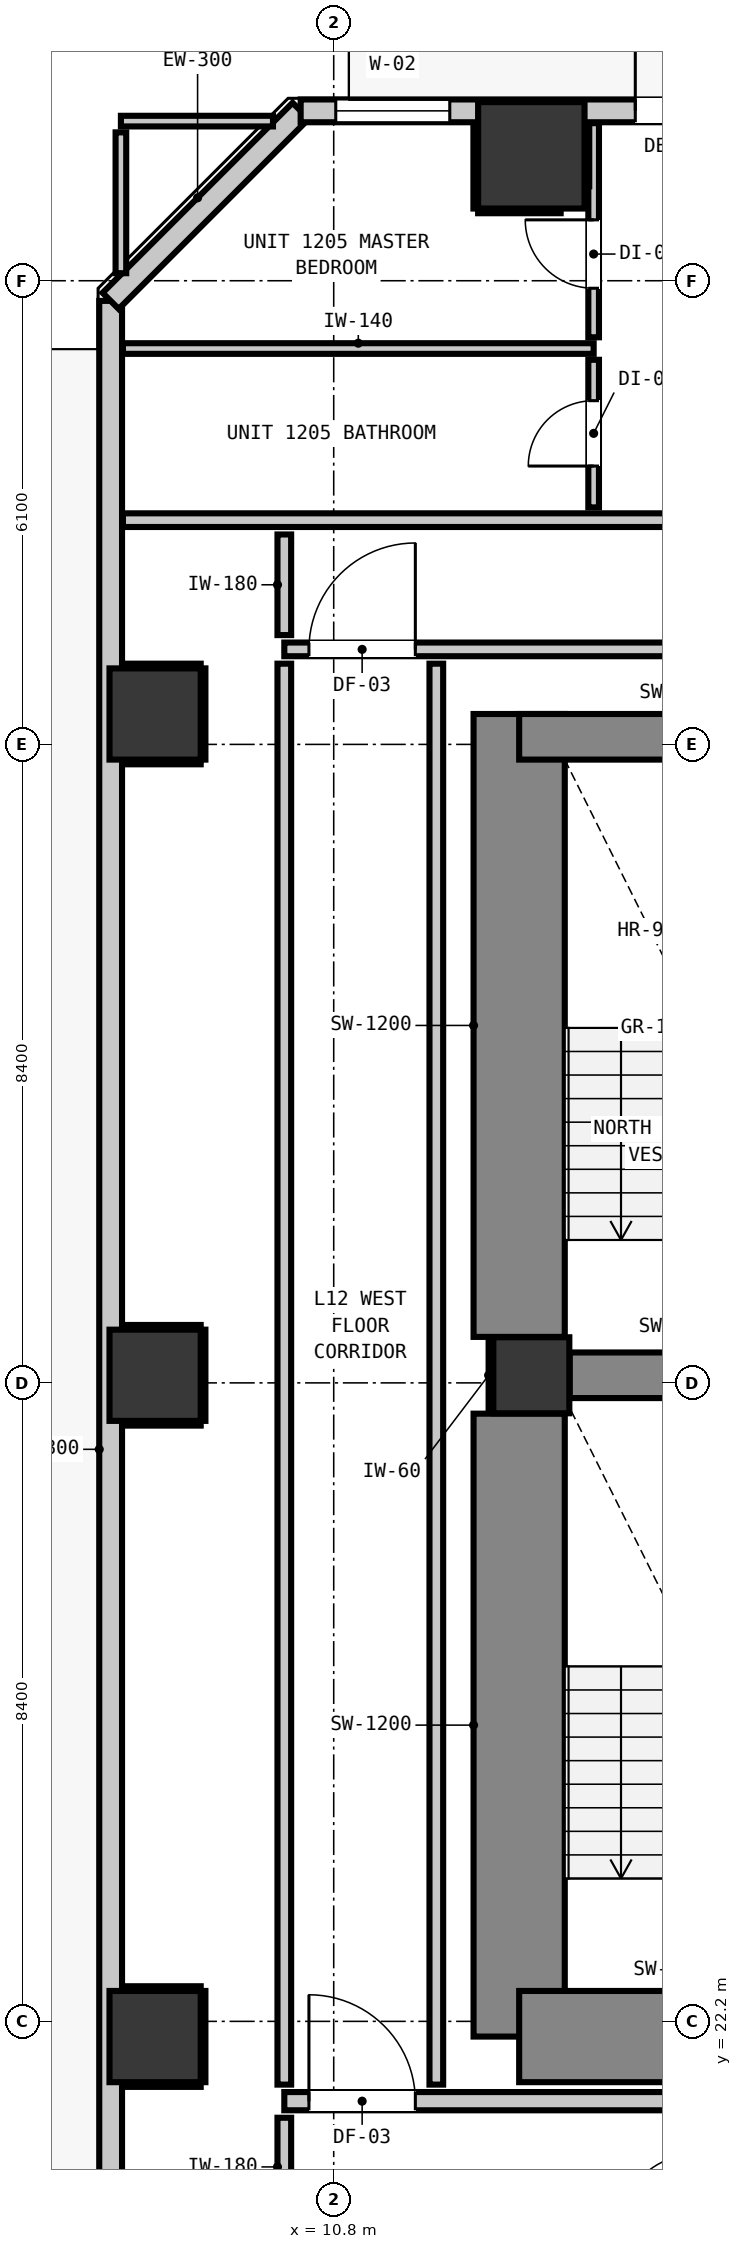
"""IFC4 building model, lengths in metres.
Left out: names, types, materials, properties, quantities, classifications, styles, units other than length and angle.
Written with IfcOpenShell. Run it as: python <this file> out.ifc"""

import sys

from ifc_helpers import new_model, si_unit, direction, frame, frame_2d, origin, origin_2d, place, context, subcontext, project, spatial, rectangle, extrude, element, fill, save


model = new_model("IFC4")
c1 = context("Model", 3, precision=1e-05, world=origin(), true_north=direction((0.0, 1.0)))
c2 = subcontext(c1, "Body", "Model", "MODEL_VIEW")
j1 = project(units=[si_unit("LENGTHUNIT", "METRE"), si_unit("PLANEANGLEUNIT", "RADIAN")], contexts=[c1])
p1 = place(None, origin())
s1 = spatial("IfcSite", under=j1, at=p1, CompositionType="ELEMENT")
p2 = place(p1, origin())
s2 = spatial("IfcBuilding", under=s1, at=p2, CompositionType="ELEMENT")
p3 = place(p2, frame((0.0, 0.0, 45.24)))
s3 = spatial("IfcBuildingStorey", under=s2, at=p3, CompositionType="ELEMENT", Elevation=45.24)
p4 = place(p3, frame((13.4, 30.7, 0.0), z_axis=(0.0, 0.0, 1.0), x_axis=(1.0, 0.0, 0.0)))
e1 = element("IfcColumn", 1, at=p4, inside=s3, PredefinedType="COLUMN", context=c2, shape_type="SweptSolid", body=[
    extrude(rectangle(XDim=1.0, YDim=1.0, at=origin_2d()), origin(), (0.0, 0.0, 1.0), 3.32),
])
p5 = place(p3, frame((13.24, 22.0, 0.0), z_axis=(0.0, 0.0, 1.0), x_axis=(0.0, 1.0, 0.0)))
e2 = element("IfcWall", 2, at=p5, inside=s3, PredefinedType="SHEAR", context=c2, shape_type="SweptSolid", body=[
    extrude(rectangle(XDim=8.195, YDim=1.2, at=frame_2d((4.098, 0.0))), origin(), (0.0, 0.0, 1.0), 3.32),
])
p6 = place(p3, frame((13.24, 31.205, 0.0), z_axis=(0.0, 0.0, 1.0), x_axis=(0.0, 1.0, 0.0)))
e3 = element("IfcWall", 3, at=p6, inside=s3, PredefinedType="SHEAR", context=c2, shape_type="SweptSolid", body=[
    extrude(rectangle(XDim=8.195, YDim=1.2, at=frame_2d((4.097, 0.0))), origin(), (0.0, 0.0, 1.0), 3.32),
])
p7 = place(p3, frame((13.24, 22.0, 0.0), z_axis=(0.0, 0.0, 1.0), x_axis=(1.0, 0.0, 0.0)))
e4 = element("IfcWall", 4, at=p7, inside=s3, PredefinedType="SHEAR", context=c2, shape_type="SweptSolid", body=[
    extrude(rectangle(XDim=4.08, YDim=1.2, at=frame_2d((2.04, 0.0))), origin(), (0.0, 0.0, 1.0), 3.32),
])
p8 = place(p3, frame((13.24, 39.1, 0.0), z_axis=(0.0, 0.0, 1.0), x_axis=(1.0, 0.0, 0.0)))
e5 = element("IfcWall", 5, at=p8, inside=s3, PredefinedType="SHEAR", context=c2, shape_type="SweptSolid", body=[
    extrude(rectangle(XDim=4.08, YDim=0.6, at=frame_2d((2.04, 0.0))), origin(), (0.0, 0.0, 1.0), 3.32),
])
p9 = place(p3, frame((13.905, 30.7, 0.0), z_axis=(0.0, 0.0, 1.0), x_axis=(1.0, 0.0, 0.0)))
e6 = element("IfcWall", 6, at=p9, inside=s3, PredefinedType="SHEAR", context=c2, shape_type="SweptSolid", body=[
    extrude(rectangle(XDim=3.415, YDim=0.6, at=frame_2d((1.708, 0.0))), origin(), (0.0, 0.0, 1.0), 3.32),
])
p10 = place(p3, frame((13.4, 46.75, 0.0), z_axis=(0.0, 0.0, 1.0), x_axis=(1.0, 0.0, 0.0)))
e7 = element("IfcColumn", 7, at=p10, inside=s3, PredefinedType="COLUMN", context=c2, shape_type="SweptSolid", body=[
    extrude(rectangle(XDim=1.4, YDim=1.4, at=origin_2d()), origin(), (0.0, 0.0, 1.0), 3.32),
])
for number, where, z_axis, x_axis in (
    (8, (8.45, 22.0, 0.0), (0.0, 0.0, 1.0), (1.0, 0.0, 0.0)),
    (9, (8.45, 30.7, 0.0), (0.0, 0.0, 1.0), (1.0, 0.0, 0.0)),
    (10, (8.45, 39.4, 0.0), (0.0, 0.0, 1.0), (1.0, 0.0, 0.0)),
):
    element("IfcColumn", number, at=place(p3, frame(where, z_axis=z_axis, x_axis=x_axis)), inside=s3, PredefinedType="COLUMN", context=c2, shape_type="SweptSolid", body=[
        extrude(rectangle(XDim=1.2, YDim=1.2, at=origin_2d()), origin(), (0.0, 0.0, 1.0), 3.32),
    ])
p11 = place(p3, frame((7.865, 10.165, 0.0), z_axis=(0.0, 0.0, 1.0), x_axis=(0.0, 1.0, 0.0)))
e11 = element("IfcWall", 11, at=p11, inside=s3, PredefinedType="STANDARD", context=c2, shape_type="SweptSolid", body=[
    extrude(rectangle(XDim=34.67, YDim=0.3, at=frame_2d((17.335, 0.0))), origin(), (0.0, 0.0, 1.0), 3.06),
])
p12 = place(p11, frame((3.352, 0.0, 0.0)))
e12 = element("IfcOpeningElement", 12, at=p12, cuts=e11, PredefinedType="OPENING", context=c2, shape_type="SweptSolid", body=[
    extrude(rectangle(XDim=1.0, YDim=2.15, at=frame_2d((0.5, 1.075))), frame((0.0, 0.16, 0.0), z_axis=(0.0, -1.0, 0.0), x_axis=(1.0, 0.0, 0.0)), (0.0, 0.0, 1.0), 0.32),
])
p13 = place(p3, frame((7.865, 44.835, 0.0), z_axis=(0.0, 0.0, 1.0), x_axis=(0.707106781187, 0.707106781187, 0.0)))
e13 = element("IfcWall", 13, at=p13, inside=s3, PredefinedType="STANDARD", context=c2, shape_type="SweptSolid", body=[
    extrude(rectangle(XDim=3.536, YDim=0.3, at=frame_2d((1.768, 0.0))), origin(), (0.0, 0.0, 1.0), 3.06),
])
p14 = place(p3, frame((10.365, 47.335, 0.0), z_axis=(0.0, 0.0, 1.0), x_axis=(1.0, 0.0, 0.0)))
e14 = element("IfcWall", 14, at=p14, inside=s3, PredefinedType="STANDARD", context=c2, shape_type="SweptSolid", body=[
    extrude(rectangle(XDim=37.47, YDim=0.3, at=frame_2d((18.735, 0.0))), origin(), (0.0, 0.0, 1.0), 3.06),
])
p15 = place(p14, frame((4.403, 0.0, 0.0)))
e15 = element("IfcOpeningElement", 15, at=p15, cuts=e14, PredefinedType="OPENING", context=c2, shape_type="SweptSolid", body=[
    extrude(rectangle(XDim=1.0, YDim=2.15, at=frame_2d((0.5, 1.075))), frame((0.0, 0.16, 0.0), z_axis=(0.0, -1.0, 0.0), x_axis=(1.0, 0.0, 0.0)), (0.0, 0.0, 1.0), 0.32),
])
p16 = place(p14, frame((5.814, 0.0, 0.85)))
e16 = element("IfcOpeningElement", 16, at=p16, cuts=e14, PredefinedType="OPENING", context=c2, shape_type="SweptSolid", body=[
    extrude(rectangle(XDim=0.58, YDim=1.5, at=frame_2d((0.29, 0.75))), frame((0.0, 0.16, 0.0), z_axis=(0.0, -1.0, 0.0), x_axis=(1.0, 0.0, 0.0)), (0.0, 0.0, 1.0), 0.32),
])
p17 = place(p14, frame((0.462, 0.0, 0.85)))
e17 = element("IfcOpeningElement", 17, at=p17, cuts=e14, PredefinedType="OPENING", context=c2, shape_type="SweptSolid", body=[
    extrude(rectangle(XDim=1.5, YDim=1.8, at=frame_2d((0.75, 0.9))), frame((0.0, 0.16, 0.0), z_axis=(0.0, -1.0, 0.0), x_axis=(1.0, 0.0, 0.0)), (0.0, 0.0, 1.0), 0.32),
])
p18 = place(p14, frame((13.885, 0.0, 0.85)))
e18 = element("IfcOpeningElement", 18, at=p18, cuts=e14, PredefinedType="OPENING", context=c2, shape_type="SweptSolid", body=[
    extrude(rectangle(XDim=1.5, YDim=1.8, at=frame_2d((0.75, 0.9))), frame((0.0, 0.16, 0.0), z_axis=(0.0, -1.0, 0.0), x_axis=(1.0, 0.0, 0.0)), (0.0, 0.0, 1.0), 0.32),
])
p19 = place(p14, frame((31.742, 0.0, 0.85)))
e19 = element("IfcOpeningElement", 19, at=p19, cuts=e14, PredefinedType="OPENING", context=c2, shape_type="SweptSolid", body=[
    extrude(rectangle(XDim=1.5, YDim=1.8, at=frame_2d((0.75, 0.9))), frame((0.0, 0.16, 0.0), z_axis=(0.0, -1.0, 0.0), x_axis=(1.0, 0.0, 0.0)), (0.0, 0.0, 1.0), 0.32),
])
p20 = place(p14, frame((27.268, 0.0, 0.85)))
e20 = element("IfcOpeningElement", 20, at=p20, cuts=e14, PredefinedType="OPENING", context=c2, shape_type="SweptSolid", body=[
    extrude(rectangle(XDim=1.5, YDim=1.8, at=frame_2d((0.75, 0.9))), frame((0.0, 0.16, 0.0), z_axis=(0.0, -1.0, 0.0), x_axis=(1.0, 0.0, 0.0)), (0.0, 0.0, 1.0), 0.32),
])
p21 = place(p3, frame((10.15, 21.15, 0.0), z_axis=(0.0, 0.0, 1.0), x_axis=(1.0, 0.0, 0.0)))
e21 = element("IfcWall", 21, at=p21, inside=s3, PredefinedType="PARTITIONING", context=c2, shape_type="SweptSolid", body=[
    extrude(rectangle(XDim=40.023, YDim=0.24, at=frame_2d((20.012, 0.0))), origin(), (0.0, 0.0, 1.0), 3.06),
])
p22 = place(p21, frame((8.06, 0.0, 0.0)))
e22 = element("IfcOpeningElement", 22, at=p22, cuts=e21, PredefinedType="OPENING", context=c2, shape_type="SweptSolid", body=[
    extrude(rectangle(XDim=1.1, YDim=2.15, at=frame_2d((0.55, 1.075))), frame((0.0, 0.13, 0.0), z_axis=(0.0, -1.0, 0.0), x_axis=(1.0, 0.0, 0.0)), (0.0, 0.0, 1.0), 0.26),
])
p23 = place(p21, frame((0.324, 0.0, 0.0)))
e23 = element("IfcOpeningElement", 23, at=p23, cuts=e21, PredefinedType="OPENING", context=c2, shape_type="SweptSolid", body=[
    extrude(rectangle(XDim=1.4, YDim=2.15, at=frame_2d((0.7, 1.075))), frame((0.0, 0.13, 0.0), z_axis=(0.0, -1.0, 0.0), x_axis=(1.0, 0.0, 0.0)), (0.0, 0.0, 1.0), 0.26),
])
p24 = place(p21, frame((33.574, 0.0, 0.0)))
e24 = element("IfcOpeningElement", 24, at=p24, cuts=e21, PredefinedType="OPENING", context=c2, shape_type="SweptSolid", body=[
    extrude(rectangle(XDim=1.0, YDim=2.15, at=frame_2d((0.5, 1.075))), frame((0.0, 0.13, 0.0), z_axis=(0.0, -1.0, 0.0), x_axis=(1.0, 0.0, 0.0)), (0.0, 0.0, 1.0), 0.26),
])
p25 = place(p3, frame((10.15, 40.25, 0.0), z_axis=(0.0, 0.0, 1.0), x_axis=(1.0, 0.0, 0.0)))
e25 = element("IfcWall", 25, at=p25, inside=s3, PredefinedType="PARTITIONING", context=c2, shape_type="SweptSolid", body=[
    extrude(rectangle(XDim=26.782, YDim=0.18, at=frame_2d((13.391, 0.0))), origin(), (0.0, 0.0, 1.0), 3.06),
])
p26 = place(p25, frame((7.285, 0.0, 0.0)))
e26 = element("IfcOpeningElement", 26, at=p26, cuts=e25, PredefinedType="OPENING", context=c2, shape_type="SweptSolid", body=[
    extrude(rectangle(XDim=1.4, YDim=2.15, at=frame_2d((0.7, 1.075))), frame((0.0, 0.1, 0.0), z_axis=(0.0, -1.0, 0.0), x_axis=(1.0, 0.0, 0.0)), (0.0, 0.0, 1.0), 0.2),
])
p27 = place(p25, frame((0.324, 0.0, 0.0)))
e27 = element("IfcOpeningElement", 27, at=p27, cuts=e25, PredefinedType="OPENING", context=c2, shape_type="SweptSolid", body=[
    extrude(rectangle(XDim=1.4, YDim=2.15, at=frame_2d((0.7, 1.075))), frame((0.0, 0.1, 0.0), z_axis=(0.0, -1.0, 0.0), x_axis=(1.0, 0.0, 0.0)), (0.0, 0.0, 1.0), 0.2),
])
p28 = place(p3, frame((8.027, 41.95, 0.0), z_axis=(0.0, 0.0, 1.0), x_axis=(1.0, 0.0, 0.0)))
e28 = element("IfcWall", 28, at=p28, inside=s3, PredefinedType="PARTITIONING", context=c2, shape_type="SweptSolid", body=[
    extrude(rectangle(XDim=28.905, YDim=0.18, at=frame_2d((14.452, 0.0))), origin(), (0.0, 0.0, 1.0), 3.06),
])
p29 = place(p28, frame((7.118, 0.0, 0.0)))
e29 = element("IfcOpeningElement", 29, at=p29, cuts=e28, PredefinedType="OPENING", context=c2, shape_type="SweptSolid", body=[
    extrude(rectangle(XDim=1.0, YDim=2.15, at=frame_2d((0.5, 1.075))), frame((0.0, 0.1, 0.0), z_axis=(0.0, -1.0, 0.0), x_axis=(1.0, 0.0, 0.0)), (0.0, 0.0, 1.0), 0.2),
])
p30 = place(p28, frame((16.943, 0.0, 0.0)))
e30 = element("IfcOpeningElement", 30, at=p30, cuts=e28, PredefinedType="OPENING", context=c2, shape_type="SweptSolid", body=[
    extrude(rectangle(XDim=1.0, YDim=2.15, at=frame_2d((0.5, 1.075))), frame((0.0, 0.1, 0.0), z_axis=(0.0, -1.0, 0.0), x_axis=(1.0, 0.0, 0.0)), (0.0, 0.0, 1.0), 0.2),
])
p31 = place(p3, frame((8.027, 44.208, 0.0), z_axis=(0.0, 0.0, 1.0), x_axis=(1.0, 0.0, 0.0)))
e31 = element("IfcWall", 31, at=p31, inside=s3, PredefinedType="PARTITIONING", context=c2, shape_type="SweptSolid", body=[
    extrude(rectangle(XDim=6.193, YDim=0.14, at=frame_2d((3.096, 0.0))), origin(), (0.0, 0.0, 1.0), 3.06),
])
p32 = place(p3, frame((8.0, 47.2, 0.0), z_axis=(0.0, 0.0, 1.0), x_axis=(1.0, 0.0, 0.0)))
e32 = element("IfcWall", 32, at=p32, inside=s3, PredefinedType="PARTITIONING", context=c2, shape_type="SweptSolid", body=[
    extrude(rectangle(XDim=2.001, YDim=0.14, at=frame_2d((1.0, 0.0))), origin(), (0.0, 0.0, 1.0), 3.06),
])
p33 = place(p3, frame((10.15, 19.638, 0.0), z_axis=(0.0, 0.0, 1.0), x_axis=(0.0, 1.0, 0.0)))
e33 = element("IfcWall", 33, at=p33, inside=s3, PredefinedType="PARTITIONING", context=c2, shape_type="SweptSolid", body=[
    extrude(rectangle(XDim=1.294, YDim=0.18, at=frame_2d((0.647, 0.0))), origin(), (0.0, 0.0, 1.0), 3.06),
])
p34 = place(p3, frame((10.15, 21.368, 0.0), z_axis=(0.0, 0.0, 1.0), x_axis=(0.0, 1.0, 0.0)))
e34 = element("IfcWall", 34, at=p34, inside=s3, PredefinedType="PARTITIONING", context=c2, shape_type="SweptSolid", body=[
    extrude(rectangle(XDim=18.694, YDim=0.18, at=frame_2d((9.347, 0.0))), origin(), (0.0, 0.0, 1.0), 3.06),
])
p35 = place(p3, frame((10.15, 40.438, 0.0), z_axis=(0.0, 0.0, 1.0), x_axis=(0.0, 1.0, 0.0)))
e35 = element("IfcWall", 35, at=p35, inside=s3, PredefinedType="PARTITIONING", context=c2, shape_type="SweptSolid", body=[
    extrude(rectangle(XDim=1.324, YDim=0.18, at=frame_2d((0.662, 0.0))), origin(), (0.0, 0.0, 1.0), 2.445),
])
p36 = place(p3, frame((12.15, 21.368, 0.0), z_axis=(0.0, 0.0, 1.0), x_axis=(0.0, 1.0, 0.0)))
e36 = element("IfcWall", 36, at=p36, inside=s3, PredefinedType="PARTITIONING", context=c2, shape_type="SweptSolid", body=[
    extrude(rectangle(XDim=18.694, YDim=0.18, at=frame_2d((9.347, 0.0))), origin(), (0.0, 0.0, 1.0), 3.06),
])
p37 = place(p3, frame((8.0, 45.199, 0.0), z_axis=(0.0, 0.0, 1.0), x_axis=(0.0, 1.0, 0.0)))
e37 = element("IfcWall", 37, at=p37, inside=s3, PredefinedType="PARTITIONING", context=c2, shape_type="SweptSolid", body=[
    extrude(rectangle(XDim=1.853, YDim=0.14, at=frame_2d((0.927, 0.0))), origin(), (0.0, 0.0, 1.0), 3.06),
])
p38 = place(p3, frame((14.22, 42.118, 0.0), z_axis=(0.0, 0.0, 1.0), x_axis=(0.0, 1.0, 0.0)))
e38 = element("IfcWall", 38, at=p38, inside=s3, PredefinedType="PARTITIONING", context=c2, shape_type="SweptSolid", body=[
    extrude(rectangle(XDim=1.942, YDim=0.14, at=frame_2d((0.971, 0.0))), origin(), (0.0, 0.0, 1.0), 3.06),
])
p39 = place(p38, frame((0.544, 0.0, 0.0)))
e39 = element("IfcOpeningElement", 39, at=p39, cuts=e38, PredefinedType="OPENING", context=c2, shape_type="SweptSolid", body=[
    extrude(rectangle(XDim=0.86, YDim=2.02, at=frame_2d((0.43, 1.01))), frame((0.0, 0.08, 0.0), z_axis=(0.0, -1.0, 0.0), x_axis=(1.0, 0.0, 0.0)), (0.0, 0.0, 1.0), 0.16),
])
p40 = place(p3, frame((14.22, 44.356, 0.0), z_axis=(0.0, 0.0, 1.0), x_axis=(0.0, 1.0, 0.0)))
e40 = element("IfcWall", 40, at=p40, inside=s3, PredefinedType="PARTITIONING", context=c2, shape_type="SweptSolid", body=[
    extrude(rectangle(XDim=2.817, YDim=0.14, at=frame_2d((1.409, 0.0))), origin(), (0.0, 0.0, 1.0), 3.06),
])
p41 = place(p40, frame((0.645, 0.0, 0.0)))
e41 = element("IfcOpeningElement", 41, at=p41, cuts=e40, PredefinedType="OPENING", context=c2, shape_type="SweptSolid", body=[
    extrude(rectangle(XDim=0.9, YDim=2.1, at=frame_2d((0.45, 1.05))), frame((0.0, 0.08, 0.0), z_axis=(0.0, -1.0, 0.0), x_axis=(1.0, 0.0, 0.0)), (0.0, 0.0, 1.0), 0.16),
])
p42 = place(p3, frame((12.868, 30.21, 0.0), z_axis=(0.0, 0.0, 1.0), x_axis=(0.0, 1.0, 0.0)))
e42 = element("IfcWall", 42, at=p42, inside=s3, PredefinedType="PARTITIONING", context=c2, shape_type="SweptSolid", body=[
    extrude(rectangle(XDim=0.98, YDim=0.06, at=frame_2d((0.49, 0.0))), origin(), (0.0, 0.0, 1.0), 1.45),
])
p43 = place(p3, frame((12.7, 46.018, 0.0), z_axis=(0.0, 0.0, 1.0), x_axis=(1.0, 0.0, 0.0)))
e43 = element("IfcWall", 43, at=p43, inside=s3, PredefinedType="PARTITIONING", context=c2, shape_type="SweptSolid", body=[
    extrude(rectangle(XDim=1.086, YDim=0.06, at=frame_2d((0.543, 0.0))), origin(), (0.0, 0.0, 1.0), 1.45),
])
p44 = place(p3, frame((12.668, 46.05, 0.0), z_axis=(0.0, 0.0, 1.0), x_axis=(0.0, 1.0, 0.0)))
e44 = element("IfcWall", 44, at=p44, inside=s3, PredefinedType="PARTITIONING", context=c2, shape_type="SweptSolid", body=[
    extrude(rectangle(XDim=1.12, YDim=0.06, at=frame_2d((0.56, 0.0))), origin(), (0.0, 0.0, 1.0), 1.45),
])
p45 = place(p3, frame((14.132, 46.342, 0.0), z_axis=(0.0, 0.0, 1.0), x_axis=(0.0, 1.0, 0.0)))
e45 = element("IfcWall", 45, at=p45, inside=s3, PredefinedType="PARTITIONING", context=c2, shape_type="SweptSolid", body=[
    extrude(rectangle(XDim=0.828, YDim=0.06, at=frame_2d((0.414, 0.0))), origin(), (0.0, 0.0, 1.0), 1.45),
])
for number, where, z_axis, x_axis in (
    (46, (8.03, 21.368, 0.0), (0.0, 0.0, 1.0), (1.0, 0.0, 0.0)),
    (47, (8.03, 22.632, 0.0), (0.0, 0.0, 1.0), (1.0, 0.0, 0.0)),
):
    element("IfcWall", number, at=place(p3, frame(where, z_axis=z_axis, x_axis=x_axis)), inside=s3, PredefinedType="PARTITIONING", context=c2, shape_type="SweptSolid", body=[
        extrude(rectangle(XDim=1.02, YDim=0.06, at=frame_2d((0.51, 0.0))), origin(), (0.0, 0.0, 1.0), 1.45),
    ])
p46 = place(p3, frame((9.082, 21.4, 0.0), z_axis=(0.0, 0.0, 1.0), x_axis=(0.0, 1.0, 0.0)))
e48 = element("IfcWall", 48, at=p46, inside=s3, PredefinedType="PARTITIONING", context=c2, shape_type="SweptSolid", body=[
    extrude(rectangle(XDim=1.2, YDim=0.06, at=frame_2d((0.6, 0.0))), origin(), (0.0, 0.0, 1.0), 1.45),
])
for number, where, z_axis, x_axis in (
    (49, (8.03, 30.068, 0.0), (0.0, 0.0, 1.0), (1.0, 0.0, 0.0)),
    (50, (8.03, 31.332, 0.0), (0.0, 0.0, 1.0), (1.0, 0.0, 0.0)),
):
    element("IfcWall", number, at=place(p3, frame(where, z_axis=z_axis, x_axis=x_axis)), inside=s3, PredefinedType="PARTITIONING", context=c2, shape_type="SweptSolid", body=[
        extrude(rectangle(XDim=1.02, YDim=0.06, at=frame_2d((0.51, 0.0))), origin(), (0.0, 0.0, 1.0), 1.45),
    ])
p47 = place(p3, frame((9.082, 30.1, 0.0), z_axis=(0.0, 0.0, 1.0), x_axis=(0.0, 1.0, 0.0)))
e51 = element("IfcWall", 51, at=p47, inside=s3, PredefinedType="PARTITIONING", context=c2, shape_type="SweptSolid", body=[
    extrude(rectangle(XDim=1.2, YDim=0.06, at=frame_2d((0.6, 0.0))), origin(), (0.0, 0.0, 1.0), 1.45),
])
for number, where, z_axis, x_axis in (
    (52, (8.03, 38.768, 0.0), (0.0, 0.0, 1.0), (1.0, 0.0, 0.0)),
    (53, (8.03, 40.032, 0.0), (0.0, 0.0, 1.0), (1.0, 0.0, 0.0)),
):
    element("IfcWall", number, at=place(p3, frame(where, z_axis=z_axis, x_axis=x_axis)), inside=s3, PredefinedType="PARTITIONING", context=c2, shape_type="SweptSolid", body=[
        extrude(rectangle(XDim=1.02, YDim=0.06, at=frame_2d((0.51, 0.0))), origin(), (0.0, 0.0, 1.0), 1.45),
    ])
p48 = place(p3, frame((9.082, 38.8, 0.0), z_axis=(0.0, 0.0, 1.0), x_axis=(0.0, 1.0, 0.0)))
e54 = element("IfcWall", 54, at=p48, inside=s3, PredefinedType="PARTITIONING", context=c2, shape_type="SweptSolid", body=[
    extrude(rectangle(XDim=1.2, YDim=0.06, at=frame_2d((0.6, 0.0))), origin(), (0.0, 0.0, 1.0), 1.45),
])
p49 = place(p15, origin())
e55 = element("IfcDoor", 55, at=p49, inside=s3, OperationType="SINGLE_SWING_LEFT", PredefinedType="DOOR", context=c2, shape_type="SweptSolid", body=[
    extrude(rectangle(XDim=1.0, YDim=2.15, at=frame_2d((0.5, 1.075))), frame((0.0, 0.025, 0.0), z_axis=(0.0, -1.0, 0.0), x_axis=(1.0, 0.0, 0.0)), (0.0, 0.0, 1.0), 0.05),
])
fill(e15, e55)
p50 = place(p17, origin())
e56 = element("IfcWindow", 56, at=p50, inside=s3, PartitioningType="SINGLE_PANEL", PredefinedType="WINDOW", context=c2, shape_type="SweptSolid", body=[
    extrude(rectangle(XDim=1.5, YDim=1.8, at=frame_2d((0.75, 0.9))), frame((0.0, 0.03, 0.0), z_axis=(0.0, -1.0, 0.0), x_axis=(1.0, 0.0, 0.0)), (0.0, 0.0, 1.0), 0.06),
])
fill(e17, e56)
p51 = place(p23, origin())
e57 = element("IfcDoor", 57, at=p51, inside=s3, OperationType="SINGLE_SWING_LEFT", PredefinedType="DOOR", context=c2, shape_type="SweptSolid", body=[
    extrude(rectangle(XDim=1.4, YDim=2.15, at=frame_2d((0.7, 1.075))), frame((0.0, 0.025, 0.0), z_axis=(0.0, -1.0, 0.0), x_axis=(1.0, 0.0, 0.0)), (0.0, 0.0, 1.0), 0.05),
])
fill(e23, e57)
p52 = place(p27, origin())
e58 = element("IfcDoor", 58, at=p52, inside=s3, OperationType="SINGLE_SWING_RIGHT", PredefinedType="DOOR", context=c2, shape_type="SweptSolid", body=[
    extrude(rectangle(XDim=1.4, YDim=2.15, at=frame_2d((0.7, 1.075))), frame((0.0, 0.025, 0.0), z_axis=(0.0, -1.0, 0.0), x_axis=(1.0, 0.0, 0.0)), (0.0, 0.0, 1.0), 0.05),
])
fill(e27, e58)
p53 = place(p39, origin())
e59 = element("IfcDoor", 59, at=p53, inside=s3, OperationType="SINGLE_SWING_LEFT", PredefinedType="DOOR", context=c2, shape_type="SweptSolid", body=[
    extrude(rectangle(XDim=0.86, YDim=2.02, at=frame_2d((0.43, 1.01))), frame((0.0, 0.025, 0.0), z_axis=(0.0, -1.0, 0.0), x_axis=(1.0, 0.0, 0.0)), (0.0, 0.0, 1.0), 0.05),
])
fill(e39, e59)
p54 = place(p41, origin())
e60 = element("IfcDoor", 60, at=p54, inside=s3, OperationType="SINGLE_SWING_RIGHT", PredefinedType="DOOR", context=c2, shape_type="SweptSolid", body=[
    extrude(rectangle(XDim=0.9, YDim=2.1, at=frame_2d((0.45, 1.05))), frame((0.0, 0.025, 0.0), z_axis=(0.0, -1.0, 0.0), x_axis=(1.0, 0.0, 0.0)), (0.0, 0.0, 1.0), 0.05),
])
fill(e41, e60)
save(model, sys.argv[1])
